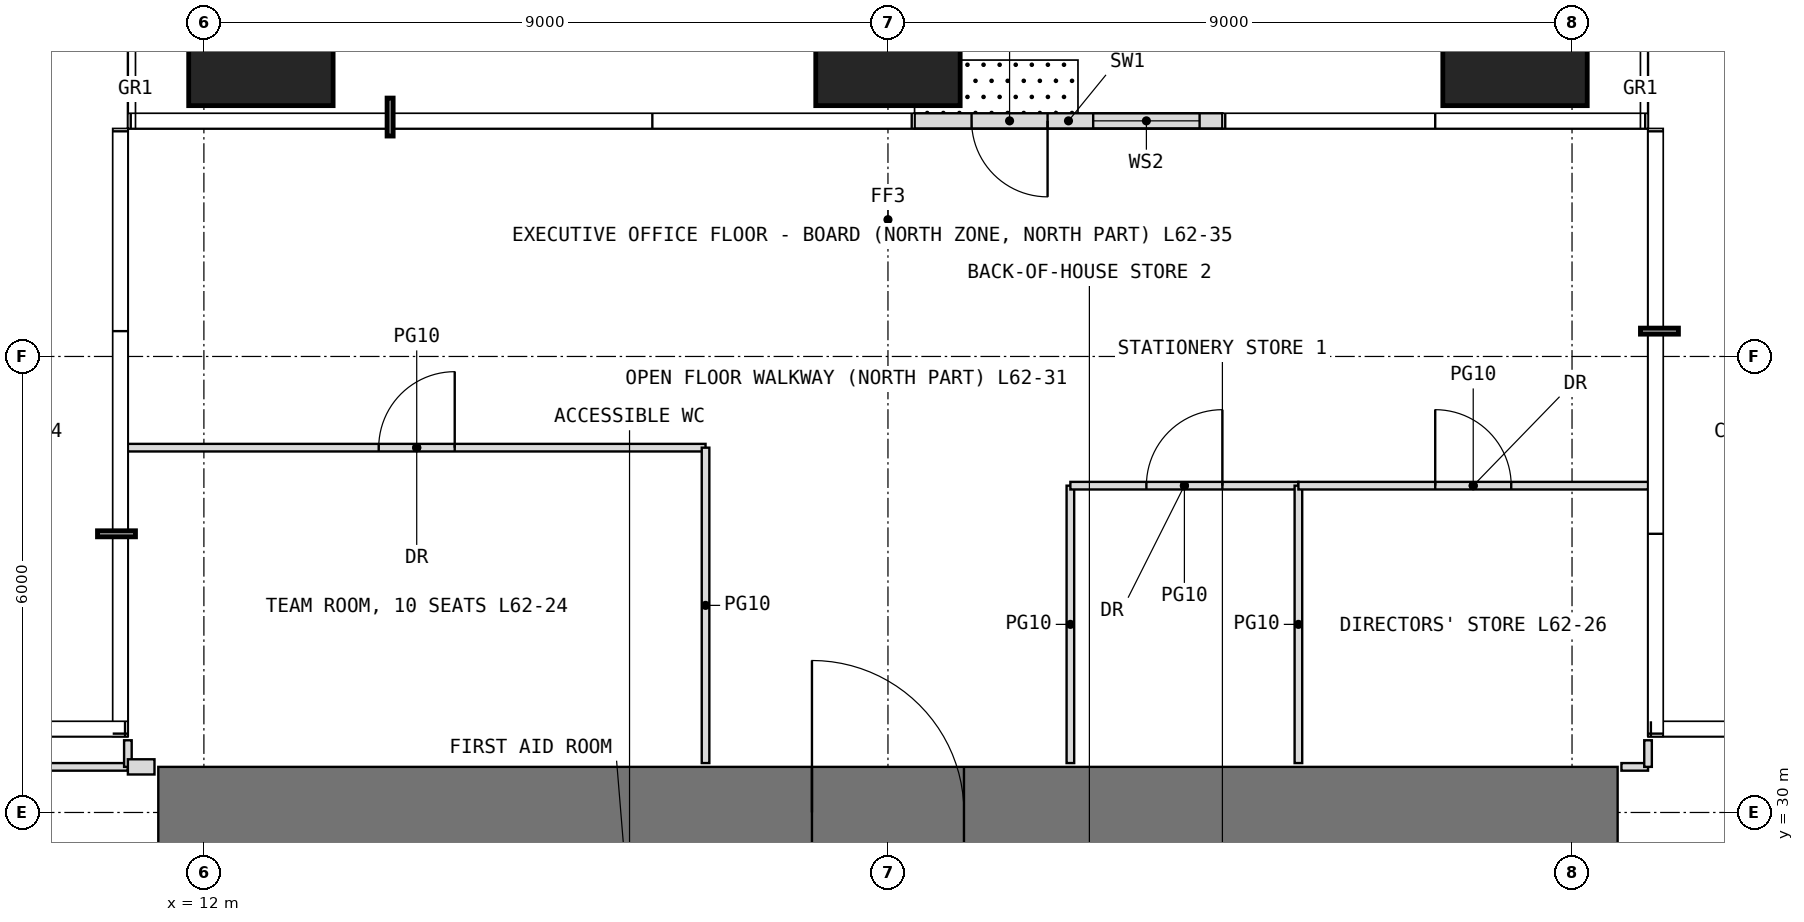
"""IFC4 building model, lengths in metres.
Left out: names, types, materials, properties, quantities, classifications, styles, units other than length and angle.
Written with IfcOpenShell. Run it as: python <this file> out.ifc"""

import sys

from ifc_helpers import new_model, si_unit, direction, frame, frame_2d, origin, origin_2d, place, context, subcontext, project, spatial, rectangle, extrude, element, fill, save


model = new_model("IFC4")
c1 = context("Model", 3, precision=1e-05, world=origin(), true_north=direction((0.0, 1.0)))
c2 = subcontext(c1, "Body", "Model", "MODEL_VIEW")
j1 = project(units=[si_unit("LENGTHUNIT", "METRE"), si_unit("PLANEANGLEUNIT", "RADIAN")], contexts=[c1])
p1 = place(None, origin())
s1 = spatial("IfcSite", under=j1, at=p1, CompositionType="ELEMENT")
p2 = place(p1, origin())
s2 = spatial("IfcBuilding", under=s1, at=p2, CompositionType="ELEMENT")
p3 = place(p2, frame((0.0, 0.0, 260.8)))
s3 = spatial("IfcBuildingStorey", under=s2, at=p3, CompositionType="ELEMENT", Elevation=260.8)
for number, where, z_axis, x_axis in (
    (1, (12.75, 40.25, 0.0), (0.0, 0.0, 1.0), (1.0, 0.0, 0.0)),
    (2, (21.0, 40.25, 0.0), (0.0, 0.0, 1.0), (1.0, 0.0, 0.0)),
    (3, (29.25, 40.25, 0.0), (0.0, 0.0, 1.0), (1.0, 0.0, 0.0)),
):
    element("IfcColumn", number, at=place(p3, frame(where, z_axis=z_axis, x_axis=x_axis)), inside=s3, PredefinedType="COLUMN", context=c2, shape_type="SweptSolid", body=[
        extrude(rectangle(XDim=1.9, YDim=1.9, at=origin_2d()), origin(), (0.0, 0.0, 1.0), 4.2),
    ])
p4 = place(p3, frame((25.4, 39.1, 0.0), z_axis=(0.0, 0.0, 1.0), x_axis=(-1.0, 0.0, 0.0)))
e4 = element("IfcWall", 4, at=p4, inside=s3, PredefinedType="USERDEFINED", context=c2, shape_type="SweptSolid", body=[
    extrude(rectangle(XDim=4.05, YDim=0.2, at=frame_2d((2.025, 0.0))), origin(), (0.0, 0.0, 1.0), 3.95),
])
p5 = place(p4, frame((2.3, 0.0, 0.0)))
e5 = element("IfcOpeningElement", 5, at=p5, cuts=e4, PredefinedType="OPENING", context=c2, shape_type="SweptSolid", body=[
    extrude(rectangle(XDim=1.0, YDim=2.4, at=frame_2d((0.5, 1.2))), frame((0.0, 0.11, 0.0), z_axis=(0.0, -1.0, 0.0), x_axis=(1.0, 0.0, 0.0)), (0.0, 0.0, 1.0), 0.22),
])
p6 = place(p4, frame((0.3, 0.0, 0.3)))
e6 = element("IfcOpeningElement", 6, at=p6, cuts=e4, PredefinedType="OPENING", context=c2, shape_type="SweptSolid", body=[
    extrude(rectangle(XDim=1.4, YDim=2.7, at=frame_2d((0.7, 1.35))), frame((0.0, 0.11, 0.0), z_axis=(0.0, -1.0, 0.0), x_axis=(1.0, 0.0, 0.0)), (0.0, 0.0, 1.0), 0.22),
])
p7 = place(p3, frame((11.4, 30.0, -0.05), z_axis=(0.0, 0.0, 1.0), x_axis=(1.0, 0.0, 0.0)))
e7 = element("IfcWall", 7, at=p7, inside=s3, PredefinedType="SHEAR", context=c2, shape_type="SweptSolid", body=[
    extrude(rectangle(XDim=19.2, YDim=1.2, at=frame_2d((9.6, 0.0))), origin(), (0.0, 0.0, 1.0), 4.2),
])
p8 = place(p7, frame((8.6, 0.0, 0.05)))
e8 = element("IfcOpeningElement", 8, at=p8, cuts=e7, PredefinedType="OPENING", context=c2, shape_type="SweptSolid", body=[
    extrude(rectangle(XDim=2.0, YDim=2.2, at=frame_2d((1.0, 1.1))), frame((0.0, 0.61, 0.0), z_axis=(0.0, -1.0, 0.0), x_axis=(1.0, 0.0, 0.0)), (0.0, 0.0, 1.0), 1.22),
])
p9 = place(p3, frame((8.0, 30.6, 0.0), z_axis=(0.0, 0.0, 1.0), x_axis=(1.0, 0.0, 0.0)))
e9 = element("IfcWall", 9, at=p9, inside=s3, PredefinedType="PARTITIONING", context=c2, shape_type="SweptSolid", body=[
    extrude(rectangle(XDim=3.0, YDim=0.1, at=frame_2d((1.5, 0.0))), origin(), (0.0, 0.0, 1.0), 3.95),
])
p10 = place(p3, frame((11.0, 30.6, 0.0), z_axis=(0.0, 0.0, 1.0), x_axis=(0.0, 1.0, 0.0)))
e10 = element("IfcWall", 10, at=p10, inside=s3, PredefinedType="PARTITIONING", context=c2, shape_type="SweptSolid", body=[
    extrude(rectangle(XDim=0.35, YDim=0.1, at=frame_2d((0.175, 0.0))), origin(), (0.0, 0.0, 1.0), 3.95),
])
p11 = place(p3, frame((11.0, 30.6, 0.0), z_axis=(0.0, 0.0, 1.0), x_axis=(1.0, 0.0, 0.0)))
e11 = element("IfcWall", 11, at=p11, inside=s3, PredefinedType="PARTITIONING", context=c2, shape_type="SweptSolid", body=[
    extrude(rectangle(XDim=0.35, YDim=0.2, at=frame_2d((0.175, 0.0))), origin(), (0.0, 0.0, 1.0), 3.95),
])
p12 = place(p3, frame((11.0, 34.8, 0.0), z_axis=(0.0, 0.0, 1.0), x_axis=(1.0, 0.0, 0.0)))
e12 = element("IfcWall", 12, at=p12, inside=s3, PredefinedType="PARTITIONING", context=c2, shape_type="SweptSolid", body=[
    extrude(rectangle(XDim=7.6, YDim=0.1, at=frame_2d((3.8, 0.0))), origin(), (0.0, 0.0, 1.0), 3.95),
])
p13 = place(p12, frame((3.3, 0.0, 0.0)))
e13 = element("IfcOpeningElement", 13, at=p13, cuts=e12, PredefinedType="OPENING", context=c2, shape_type="SweptSolid", body=[
    extrude(rectangle(XDim=1.0, YDim=2.2, at=frame_2d((0.5, 1.1))), frame((0.0, 0.06, 0.0), z_axis=(0.0, -1.0, 0.0), x_axis=(1.0, 0.0, 0.0)), (0.0, 0.0, 1.0), 0.12),
])
p14 = place(p3, frame((18.6, 30.65, 0.0), z_axis=(0.0, 0.0, 1.0), x_axis=(0.0, 1.0, 0.0)))
e14 = element("IfcWall", 14, at=p14, inside=s3, PredefinedType="PARTITIONING", context=c2, shape_type="SweptSolid", body=[
    extrude(rectangle(XDim=4.15, YDim=0.1, at=frame_2d((2.075, 0.0))), origin(), (0.0, 0.0, 1.0), 3.95),
])
p15 = place(p3, frame((23.4, 30.65, 0.0), z_axis=(0.0, 0.0, 1.0), x_axis=(0.0, 1.0, 0.0)))
e15 = element("IfcWall", 15, at=p15, inside=s3, PredefinedType="PARTITIONING", context=c2, shape_type="SweptSolid", body=[
    extrude(rectangle(XDim=3.65, YDim=0.1, at=frame_2d((1.825, 0.0))), origin(), (0.0, 0.0, 1.0), 3.95),
])
p16 = place(p3, frame((23.4, 34.3, 0.0), z_axis=(0.0, 0.0, 1.0), x_axis=(1.0, 0.0, 0.0)))
e16 = element("IfcWall", 16, at=p16, inside=s3, PredefinedType="PARTITIONING", context=c2, shape_type="SweptSolid", body=[
    extrude(rectangle(XDim=3.0, YDim=0.1, at=frame_2d((1.5, 0.0))), origin(), (0.0, 0.0, 1.0), 3.95),
])
p17 = place(p16, frame((1.0, 0.0, 0.0)))
e17 = element("IfcOpeningElement", 17, at=p17, cuts=e16, PredefinedType="OPENING", context=c2, shape_type="SweptSolid", body=[
    extrude(rectangle(XDim=1.0, YDim=2.2, at=frame_2d((0.5, 1.1))), frame((0.0, 0.06, 0.0), z_axis=(0.0, -1.0, 0.0), x_axis=(1.0, 0.0, 0.0)), (0.0, 0.0, 1.0), 0.12),
])
p18 = place(p3, frame((26.4, 30.65, 0.0), z_axis=(0.0, 0.0, 1.0), x_axis=(0.0, 1.0, 0.0)))
e18 = element("IfcWall", 18, at=p18, inside=s3, PredefinedType="PARTITIONING", context=c2, shape_type="SweptSolid", body=[
    extrude(rectangle(XDim=3.65, YDim=0.1, at=frame_2d((1.825, 0.0))), origin(), (0.0, 0.0, 1.0), 3.95),
])
p19 = place(p3, frame((26.4, 34.3, 0.0), z_axis=(0.0, 0.0, 1.0), x_axis=(1.0, 0.0, 0.0)))
e19 = element("IfcWall", 19, at=p19, inside=s3, PredefinedType="PARTITIONING", context=c2, shape_type="SweptSolid", body=[
    extrude(rectangle(XDim=4.6, YDim=0.1, at=frame_2d((2.3, 0.0))), origin(), (0.0, 0.0, 1.0), 3.95),
])
p20 = place(p19, frame((1.8, 0.0, 0.0)))
e20 = element("IfcOpeningElement", 20, at=p20, cuts=e19, PredefinedType="OPENING", context=c2, shape_type="SweptSolid", body=[
    extrude(rectangle(XDim=1.0, YDim=2.2, at=frame_2d((0.5, 1.1))), frame((0.0, 0.06, 0.0), z_axis=(0.0, -1.0, 0.0), x_axis=(1.0, 0.0, 0.0)), (0.0, 0.0, 1.0), 0.12),
])
p21 = place(p3, frame((30.65, 30.6, 0.0), z_axis=(0.0, 0.0, 1.0), x_axis=(1.0, 0.0, 0.0)))
e21 = element("IfcWall", 21, at=p21, inside=s3, PredefinedType="PARTITIONING", context=c2, shape_type="SweptSolid", body=[
    extrude(rectangle(XDim=0.35, YDim=0.1, at=frame_2d((0.175, 0.0))), origin(), (0.0, 0.0, 1.0), 3.95),
])
p22 = place(p3, frame((31.0, 30.6, 0.0), z_axis=(0.0, 0.0, 1.0), x_axis=(0.0, 1.0, 0.0)))
e22 = element("IfcWall", 22, at=p22, inside=s3, PredefinedType="PARTITIONING", context=c2, shape_type="SweptSolid", body=[
    extrude(rectangle(XDim=0.35, YDim=0.1, at=frame_2d((0.175, 0.0))), origin(), (0.0, 0.0, 1.0), 3.95),
])
p23 = place(p5, origin())
e23 = element("IfcDoor", 23, at=p23, inside=s3, OperationType="SINGLE_SWING_LEFT", PredefinedType="DOOR", context=c2, shape_type="SweptSolid", body=[
    extrude(rectangle(XDim=1.0, YDim=2.4, at=frame_2d((0.5, 1.2))), frame((0.0, 0.025, 0.0), z_axis=(0.0, -1.0, 0.0), x_axis=(1.0, 0.0, 0.0)), (0.0, 0.0, 1.0), 0.05),
])
fill(e5, e23)
p24 = place(p6, origin())
e24 = element("IfcWindow", 24, at=p24, inside=s3, PartitioningType="SINGLE_PANEL", PredefinedType="WINDOW", context=c2, shape_type="SweptSolid", body=[
    extrude(rectangle(XDim=1.4, YDim=2.7, at=frame_2d((0.7, 1.35))), frame((0.0, 0.03, 0.0), z_axis=(0.0, -1.0, 0.0), x_axis=(1.0, 0.0, 0.0)), (0.0, 0.0, 1.0), 0.06),
])
fill(e6, e24)
p25 = place(p8, origin())
e25 = element("IfcDoor", 25, at=p25, inside=s3, OperationType="DOUBLE_DOOR_SINGLE_SWING", PredefinedType="DOOR", context=c2, shape_type="SweptSolid", body=[
    extrude(rectangle(XDim=2.0, YDim=2.2, at=frame_2d((1.0, 1.1))), frame((0.0, 0.025, 0.0), z_axis=(0.0, -1.0, 0.0), x_axis=(1.0, 0.0, 0.0)), (0.0, 0.0, 1.0), 0.05),
])
fill(e8, e25)
p26 = place(p13, origin())
e26 = element("IfcDoor", 26, at=p26, inside=s3, OperationType="SINGLE_SWING_RIGHT", PredefinedType="DOOR", context=c2, shape_type="SweptSolid", body=[
    extrude(rectangle(XDim=1.0, YDim=2.2, at=frame_2d((0.5, 1.1))), frame((0.0, 0.025, 0.0), z_axis=(0.0, -1.0, 0.0), x_axis=(1.0, 0.0, 0.0)), (0.0, 0.0, 1.0), 0.05),
])
fill(e13, e26)
p27 = place(p17, origin())
e27 = element("IfcDoor", 27, at=p27, inside=s3, OperationType="SINGLE_SWING_RIGHT", PredefinedType="DOOR", context=c2, shape_type="SweptSolid", body=[
    extrude(rectangle(XDim=1.0, YDim=2.2, at=frame_2d((0.5, 1.1))), frame((0.0, 0.025, 0.0), z_axis=(0.0, -1.0, 0.0), x_axis=(1.0, 0.0, 0.0)), (0.0, 0.0, 1.0), 0.05),
])
fill(e17, e27)
p28 = place(p20, origin())
e28 = element("IfcDoor", 28, at=p28, inside=s3, OperationType="SINGLE_SWING_LEFT", PredefinedType="DOOR", context=c2, shape_type="SweptSolid", body=[
    extrude(rectangle(XDim=1.0, YDim=2.2, at=frame_2d((0.5, 1.1))), frame((0.0, 0.025, 0.0), z_axis=(0.0, -1.0, 0.0), x_axis=(1.0, 0.0, 0.0)), (0.0, 0.0, 1.0), 0.05),
])
fill(e20, e28)
save(model, sys.argv[1])
